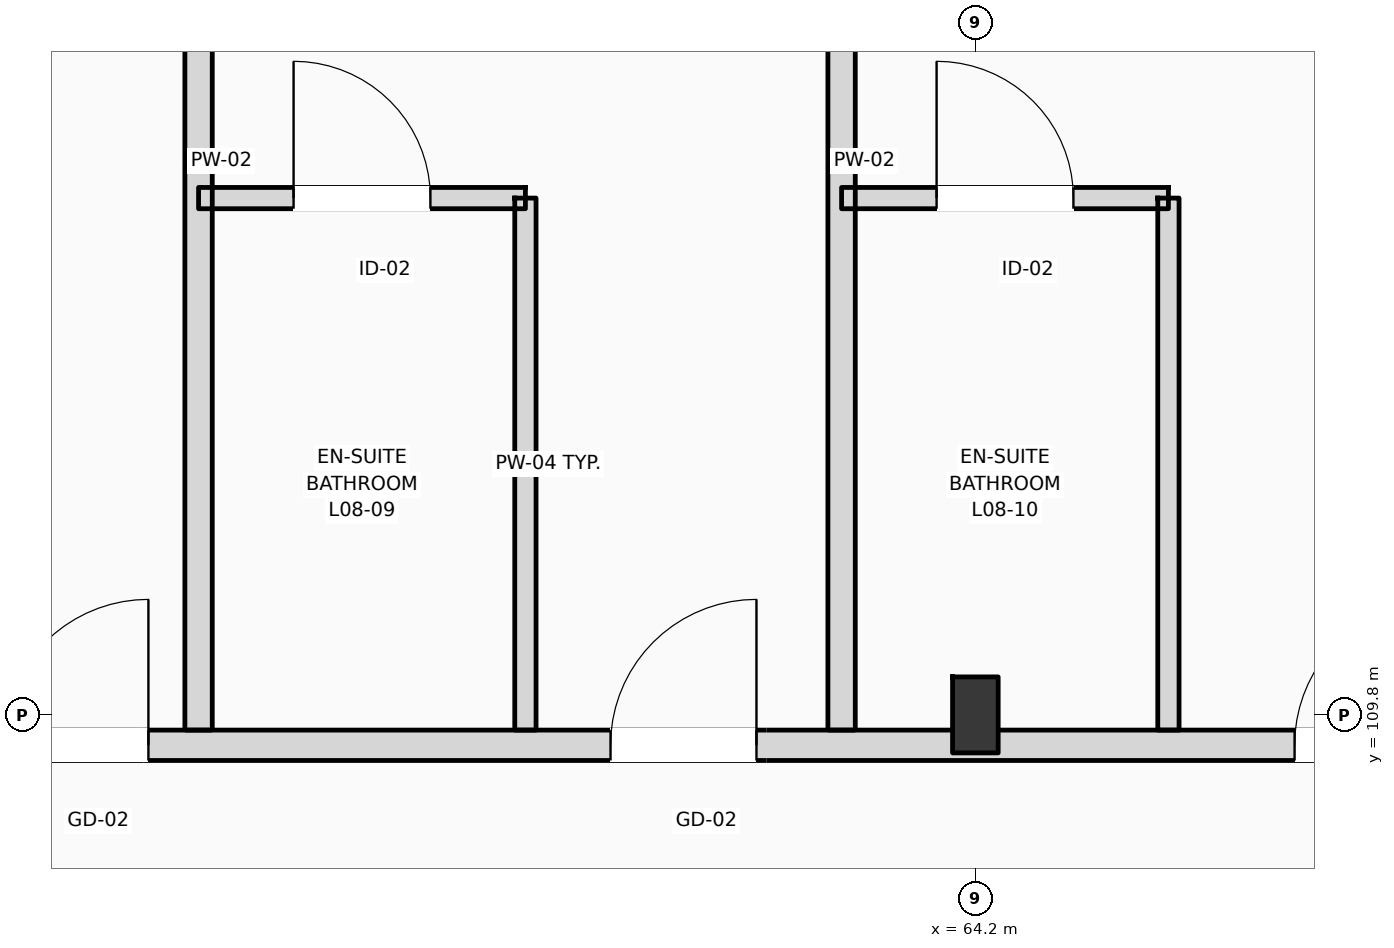
"""IFC4 building model, lengths in metres.
Left out: names, types, materials, properties, quantities, classifications, styles, units other than length and angle.
Written with IfcOpenShell. Run it as: python <this file> out.ifc"""

import sys

from ifc_helpers import new_model, si_unit, direction, frame, frame_2d, origin, origin_2d, place, context, subcontext, project, spatial, rectangle, i_section, extrude, element, fill, save


model = new_model("IFC4")
c1 = context("Model", 3, precision=1e-05, world=origin(), true_north=direction((0.0, 1.0)))
c2 = subcontext(c1, "Body", "Model", "MODEL_VIEW")
j1 = project(units=[si_unit("LENGTHUNIT", "METRE"), si_unit("PLANEANGLEUNIT", "RADIAN")], contexts=[c1])
p1 = place(None, origin())
s1 = spatial("IfcSite", under=j1, at=p1, CompositionType="ELEMENT")
p2 = place(p1, origin())
s2 = spatial("IfcBuilding", under=s1, at=p2, CompositionType="ELEMENT")
p3 = place(p2, frame((0.0, 0.0, 35.4)))
s3 = spatial("IfcBuildingStorey", under=s2, at=p3, CompositionType="ELEMENT", Elevation=35.4)
p4 = place(p3, frame((64.2, 109.8, 0.0), z_axis=(0.0, 0.0, 1.0), x_axis=(1.0, 0.0, 0.0)))
e1 = element("IfcColumn", 1, at=p4, inside=s3, PredefinedType="COLUMN", context=c2, shape_type="SweptSolid", body=[
    extrude(i_section(OverallWidth=0.3, OverallDepth=0.5, WebThickness=0.014, FlangeThickness=0.028, FilletRadius=0.027, at=origin_2d()), origin(), (0.0, 0.0, 1.0), 3.6),
])
p5 = place(p3, frame((10.65, 109.6, 0.0), z_axis=(0.0, 0.0, 1.0), x_axis=(1.0, 0.0, 0.0)))
e2 = element("IfcWall", 2, at=p5, inside=s3, PredefinedType="PARTITIONING", context=c2, shape_type="SweptSolid", body=[
    extrude(rectangle(XDim=84.61, YDim=0.2, at=frame_2d((42.305, 0.0))), origin(), (0.0, 0.0, 1.0), 2.82),
])
p6 = place(p5, frame((12.675, 0.0, 0.0)))
e3 = element("IfcOpeningElement", 3, at=p6, cuts=e2, PredefinedType="OPENING", context=c2, shape_type="SweptSolid", body=[
    extrude(rectangle(XDim=1.02, YDim=2.2, at=frame_2d((0.51, 1.1))), frame((0.0, 0.11, 0.0), z_axis=(0.0, -1.0, 0.0), x_axis=(1.0, 0.0, 0.0)), (0.0, 0.0, 1.0), 0.22),
])
p7 = place(p5, frame((19.62, 0.0, 0.0)))
e4 = element("IfcOpeningElement", 4, at=p7, cuts=e2, PredefinedType="OPENING", context=c2, shape_type="SweptSolid", body=[
    extrude(rectangle(XDim=1.02, YDim=2.2, at=frame_2d((0.51, 1.1))), frame((0.0, 0.11, 0.0), z_axis=(0.0, -1.0, 0.0), x_axis=(1.0, 0.0, 0.0)), (0.0, 0.0, 1.0), 0.22),
])
p8 = place(p5, frame((24.12, 0.0, 0.0)))
e5 = element("IfcOpeningElement", 5, at=p8, cuts=e2, PredefinedType="OPENING", context=c2, shape_type="SweptSolid", body=[
    extrude(rectangle(XDim=1.02, YDim=2.2, at=frame_2d((0.51, 1.1))), frame((0.0, 0.11, 0.0), z_axis=(0.0, -1.0, 0.0), x_axis=(1.0, 0.0, 0.0)), (0.0, 0.0, 1.0), 0.22),
])
p9 = place(p5, frame((26.47, 0.0, 0.0)))
e6 = element("IfcOpeningElement", 6, at=p9, cuts=e2, PredefinedType="OPENING", context=c2, shape_type="SweptSolid", body=[
    extrude(rectangle(XDim=1.02, YDim=2.2, at=frame_2d((0.51, 1.1))), frame((0.0, 0.11, 0.0), z_axis=(0.0, -1.0, 0.0), x_axis=(1.0, 0.0, 0.0)), (0.0, 0.0, 1.0), 0.22),
])
p10 = place(p5, frame((33.15, 0.0, 0.0)))
e7 = element("IfcOpeningElement", 7, at=p10, cuts=e2, PredefinedType="OPENING", context=c2, shape_type="SweptSolid", body=[
    extrude(rectangle(XDim=0.96, YDim=2.2, at=frame_2d((0.48, 1.1))), frame((0.0, 0.11, 0.0), z_axis=(0.0, -1.0, 0.0), x_axis=(1.0, 0.0, 0.0)), (0.0, 0.0, 1.0), 0.22),
])
p11 = place(p5, frame((35.5, 0.0, 0.0)))
e8 = element("IfcOpeningElement", 8, at=p11, cuts=e2, PredefinedType="OPENING", context=c2, shape_type="SweptSolid", body=[
    extrude(rectangle(XDim=0.96, YDim=2.2, at=frame_2d((0.48, 1.1))), frame((0.0, 0.11, 0.0), z_axis=(0.0, -1.0, 0.0), x_axis=(1.0, 0.0, 0.0)), (0.0, 0.0, 1.0), 0.22),
])
p12 = place(p5, frame((42.15, 0.0, 0.0)))
e9 = element("IfcOpeningElement", 9, at=p12, cuts=e2, PredefinedType="OPENING", context=c2, shape_type="SweptSolid", body=[
    extrude(rectangle(XDim=0.96, YDim=2.2, at=frame_2d((0.48, 1.1))), frame((0.0, 0.11, 0.0), z_axis=(0.0, -1.0, 0.0), x_axis=(1.0, 0.0, 0.0)), (0.0, 0.0, 1.0), 0.22),
])
p13 = place(p5, frame((47.15, 0.0, 0.0)))
e10 = element("IfcOpeningElement", 10, at=p13, cuts=e2, PredefinedType="OPENING", context=c2, shape_type="SweptSolid", body=[
    extrude(rectangle(XDim=0.96, YDim=2.2, at=frame_2d((0.48, 1.1))), frame((0.0, 0.11, 0.0), z_axis=(0.0, -1.0, 0.0), x_axis=(1.0, 0.0, 0.0)), (0.0, 0.0, 1.0), 0.22),
])
p14 = place(p5, frame((51.15, 0.0, 0.0)))
e11 = element("IfcOpeningElement", 11, at=p14, cuts=e2, PredefinedType="OPENING", context=c2, shape_type="SweptSolid", body=[
    extrude(rectangle(XDim=0.96, YDim=2.2, at=frame_2d((0.48, 1.1))), frame((0.0, 0.11, 0.0), z_axis=(0.0, -1.0, 0.0), x_axis=(1.0, 0.0, 0.0)), (0.0, 0.0, 1.0), 0.22),
])
p15 = place(p5, frame((55.65, 0.0, 0.0)))
e12 = element("IfcOpeningElement", 12, at=p15, cuts=e2, PredefinedType="OPENING", context=c2, shape_type="SweptSolid", body=[
    extrude(rectangle(XDim=0.96, YDim=2.2, at=frame_2d((0.48, 1.1))), frame((0.0, 0.11, 0.0), z_axis=(0.0, -1.0, 0.0), x_axis=(1.0, 0.0, 0.0)), (0.0, 0.0, 1.0), 0.22),
])
p16 = place(p5, frame((58.0, 0.0, 0.0)))
e13 = element("IfcOpeningElement", 13, at=p16, cuts=e2, PredefinedType="OPENING", context=c2, shape_type="SweptSolid", body=[
    extrude(rectangle(XDim=0.96, YDim=2.2, at=frame_2d((0.48, 1.1))), frame((0.0, 0.11, 0.0), z_axis=(0.0, -1.0, 0.0), x_axis=(1.0, 0.0, 0.0)), (0.0, 0.0, 1.0), 0.22),
])
p17 = place(p5, frame((64.65, 0.0, 0.0)))
e14 = element("IfcOpeningElement", 14, at=p17, cuts=e2, PredefinedType="OPENING", context=c2, shape_type="SweptSolid", body=[
    extrude(rectangle(XDim=0.96, YDim=2.2, at=frame_2d((0.48, 1.1))), frame((0.0, 0.11, 0.0), z_axis=(0.0, -1.0, 0.0), x_axis=(1.0, 0.0, 0.0)), (0.0, 0.0, 1.0), 0.22),
])
p18 = place(p5, frame((66.75, 0.0, 0.0)))
e15 = element("IfcOpeningElement", 15, at=p18, cuts=e2, PredefinedType="OPENING", context=c2, shape_type="SweptSolid", body=[
    extrude(rectangle(XDim=0.96, YDim=2.2, at=frame_2d((0.48, 1.1))), frame((0.0, 0.11, 0.0), z_axis=(0.0, -1.0, 0.0), x_axis=(1.0, 0.0, 0.0)), (0.0, 0.0, 1.0), 0.22),
])
p19 = place(p5, frame((73.65, 0.0, 0.0)))
e16 = element("IfcOpeningElement", 16, at=p19, cuts=e2, PredefinedType="OPENING", context=c2, shape_type="SweptSolid", body=[
    extrude(rectangle(XDim=0.96, YDim=2.2, at=frame_2d((0.48, 1.1))), frame((0.0, 0.11, 0.0), z_axis=(0.0, -1.0, 0.0), x_axis=(1.0, 0.0, 0.0)), (0.0, 0.0, 1.0), 0.22),
])
p20 = place(p5, frame((78.4, 0.0, 0.0)))
e17 = element("IfcOpeningElement", 17, at=p20, cuts=e2, PredefinedType="OPENING", context=c2, shape_type="SweptSolid", body=[
    extrude(rectangle(XDim=0.96, YDim=2.2, at=frame_2d((0.48, 1.1))), frame((0.0, 0.11, 0.0), z_axis=(0.0, -1.0, 0.0), x_axis=(1.0, 0.0, 0.0)), (0.0, 0.0, 1.0), 0.22),
])
p21 = place(p5, frame((80.455, 0.0, 0.0)))
e18 = element("IfcOpeningElement", 18, at=p21, cuts=e2, PredefinedType="OPENING", context=c2, shape_type="SweptSolid", body=[
    extrude(rectangle(XDim=0.96, YDim=2.2, at=frame_2d((0.48, 1.1))), frame((0.0, 0.11, 0.0), z_axis=(0.0, -1.0, 0.0), x_axis=(1.0, 0.0, 0.0)), (0.0, 0.0, 1.0), 0.22),
])
p22 = place(p5, frame((2.716, 0.0, 0.0)))
e19 = element("IfcOpeningElement", 19, at=p22, cuts=e2, PredefinedType="OPENING", context=c2, shape_type="SweptSolid", body=[
    extrude(rectangle(XDim=1.35, YDim=2.25, at=frame_2d((0.675, 1.125))), frame((0.0, 0.11, 0.0), z_axis=(0.0, -1.0, 0.0), x_axis=(1.0, 0.0, 0.0)), (0.0, 0.0, 1.0), 0.22),
])
p23 = place(p5, frame((6.65, 0.0, 0.0)))
e20 = element("IfcOpeningElement", 20, at=p23, cuts=e2, PredefinedType="OPENING", context=c2, shape_type="SweptSolid", body=[
    extrude(rectangle(XDim=1.35, YDim=2.25, at=frame_2d((0.675, 1.125))), frame((0.0, 0.11, 0.0), z_axis=(0.0, -1.0, 0.0), x_axis=(1.0, 0.0, 0.0)), (0.0, 0.0, 1.0), 0.22),
])
p24 = place(p5, frame((10.583, 0.0, 0.0)))
e21 = element("IfcOpeningElement", 21, at=p24, cuts=e2, PredefinedType="OPENING", context=c2, shape_type="SweptSolid", body=[
    extrude(rectangle(XDim=1.35, YDim=2.25, at=frame_2d((0.675, 1.125))), frame((0.0, 0.11, 0.0), z_axis=(0.0, -1.0, 0.0), x_axis=(1.0, 0.0, 0.0)), (0.0, 0.0, 1.0), 0.22),
])
p25 = place(p3, frame((59.09, 109.7, 0.0), z_axis=(0.0, 0.0, 1.0), x_axis=(0.0, 1.0, 0.0)))
e22 = element("IfcWall", 22, at=p25, inside=s3, PredefinedType="PARTITIONING", context=c2, shape_type="SweptSolid", body=[
    extrude(rectangle(XDim=8.15, YDim=0.18, at=frame_2d((4.075, 0.0))), origin(), (0.0, 0.0, 1.0), 3.07),
])
p26 = place(p3, frame((63.32, 109.7, 0.0), z_axis=(0.0, 0.0, 1.0), x_axis=(0.0, 1.0, 0.0)))
e23 = element("IfcWall", 23, at=p26, inside=s3, PredefinedType="PARTITIONING", context=c2, shape_type="SweptSolid", body=[
    extrude(rectangle(XDim=8.15, YDim=0.18, at=frame_2d((4.075, 0.0))), origin(), (0.0, 0.0, 1.0), 3.38),
])
p27 = place(p3, frame((61.24, 109.7, 0.0), z_axis=(0.0, 0.0, 1.0), x_axis=(0.0, 1.0, 0.0)))
e24 = element("IfcWall", 24, at=p27, inside=s3, PredefinedType="PARTITIONING", context=c2, shape_type="SweptSolid", body=[
    extrude(rectangle(XDim=3.5, YDim=0.14, at=frame_2d((1.75, 0.0))), origin(), (0.0, 0.0, 1.0), 3.38),
])
p28 = place(p3, frame((59.09, 113.2, 0.0), z_axis=(0.0, 0.0, 1.0), x_axis=(1.0, 0.0, 0.0)))
e25 = element("IfcWall", 25, at=p28, inside=s3, PredefinedType="PARTITIONING", context=c2, shape_type="SweptSolid", body=[
    extrude(rectangle(XDim=2.15, YDim=0.14, at=frame_2d((1.075, 0.0))), origin(), (0.0, 0.0, 1.0), 3.38),
])
p29 = place(p28, frame((0.625, 0.0, 0.0)))
e26 = element("IfcOpeningElement", 26, at=p29, cuts=e25, PredefinedType="OPENING", context=c2, shape_type="SweptSolid", body=[
    extrude(rectangle(XDim=0.9, YDim=2.1, at=frame_2d((0.45, 1.05))), frame((0.0, 0.08, 0.0), z_axis=(0.0, -1.0, 0.0), x_axis=(1.0, 0.0, 0.0)), (0.0, 0.0, 1.0), 0.16),
])
p30 = place(p3, frame((65.47, 109.7, 0.0), z_axis=(0.0, 0.0, 1.0), x_axis=(0.0, 1.0, 0.0)))
e27 = element("IfcWall", 27, at=p30, inside=s3, PredefinedType="PARTITIONING", context=c2, shape_type="SweptSolid", body=[
    extrude(rectangle(XDim=3.5, YDim=0.14, at=frame_2d((1.75, 0.0))), origin(), (0.0, 0.0, 1.0), 3.38),
])
p31 = place(p3, frame((63.32, 113.2, 0.0), z_axis=(0.0, 0.0, 1.0), x_axis=(1.0, 0.0, 0.0)))
e28 = element("IfcWall", 28, at=p31, inside=s3, PredefinedType="PARTITIONING", context=c2, shape_type="SweptSolid", body=[
    extrude(rectangle(XDim=2.15, YDim=0.14, at=frame_2d((1.075, 0.0))), origin(), (0.0, 0.0, 1.0), 3.38),
])
p32 = place(p31, frame((0.625, 0.0, 0.0)))
e29 = element("IfcOpeningElement", 29, at=p32, cuts=e28, PredefinedType="OPENING", context=c2, shape_type="SweptSolid", body=[
    extrude(rectangle(XDim=0.9, YDim=2.1, at=frame_2d((0.45, 1.05))), frame((0.0, 0.08, 0.0), z_axis=(0.0, -1.0, 0.0), x_axis=(1.0, 0.0, 0.0)), (0.0, 0.0, 1.0), 0.16),
])
p33 = place(p13, origin())
e30 = element("IfcDoor", 30, at=p33, inside=s3, OperationType="SINGLE_SWING_RIGHT", PredefinedType="DOOR", context=c2, shape_type="SweptSolid", body=[
    extrude(rectangle(XDim=0.96, YDim=2.2, at=frame_2d((0.48, 1.1))), frame((0.0, 0.025, 0.0), z_axis=(0.0, -1.0, 0.0), x_axis=(1.0, 0.0, 0.0)), (0.0, 0.0, 1.0), 0.05),
])
fill(e10, e30)
p34 = place(p14, origin())
e31 = element("IfcDoor", 31, at=p34, inside=s3, OperationType="SINGLE_SWING_RIGHT", PredefinedType="DOOR", context=c2, shape_type="SweptSolid", body=[
    extrude(rectangle(XDim=0.96, YDim=2.2, at=frame_2d((0.48, 1.1))), frame((0.0, 0.025, 0.0), z_axis=(0.0, -1.0, 0.0), x_axis=(1.0, 0.0, 0.0)), (0.0, 0.0, 1.0), 0.05),
])
fill(e11, e31)
p35 = place(p29, origin())
e32 = element("IfcDoor", 32, at=p35, inside=s3, OperationType="SINGLE_SWING_LEFT", PredefinedType="DOOR", context=c2, shape_type="SweptSolid", body=[
    extrude(rectangle(XDim=0.9, YDim=2.1, at=frame_2d((0.45, 1.05))), frame((0.0, 0.025, 0.0), z_axis=(0.0, -1.0, 0.0), x_axis=(1.0, 0.0, 0.0)), (0.0, 0.0, 1.0), 0.05),
])
fill(e26, e32)
p36 = place(p15, origin())
e33 = element("IfcDoor", 33, at=p36, inside=s3, OperationType="SINGLE_SWING_RIGHT", PredefinedType="DOOR", context=c2, shape_type="SweptSolid", body=[
    extrude(rectangle(XDim=0.96, YDim=2.2, at=frame_2d((0.48, 1.1))), frame((0.0, 0.025, 0.0), z_axis=(0.0, -1.0, 0.0), x_axis=(1.0, 0.0, 0.0)), (0.0, 0.0, 1.0), 0.05),
])
fill(e12, e33)
p37 = place(p32, origin())
e34 = element("IfcDoor", 34, at=p37, inside=s3, OperationType="SINGLE_SWING_LEFT", PredefinedType="DOOR", context=c2, shape_type="SweptSolid", body=[
    extrude(rectangle(XDim=0.9, YDim=2.1, at=frame_2d((0.45, 1.05))), frame((0.0, 0.025, 0.0), z_axis=(0.0, -1.0, 0.0), x_axis=(1.0, 0.0, 0.0)), (0.0, 0.0, 1.0), 0.05),
])
fill(e29, e34)
save(model, sys.argv[1])
